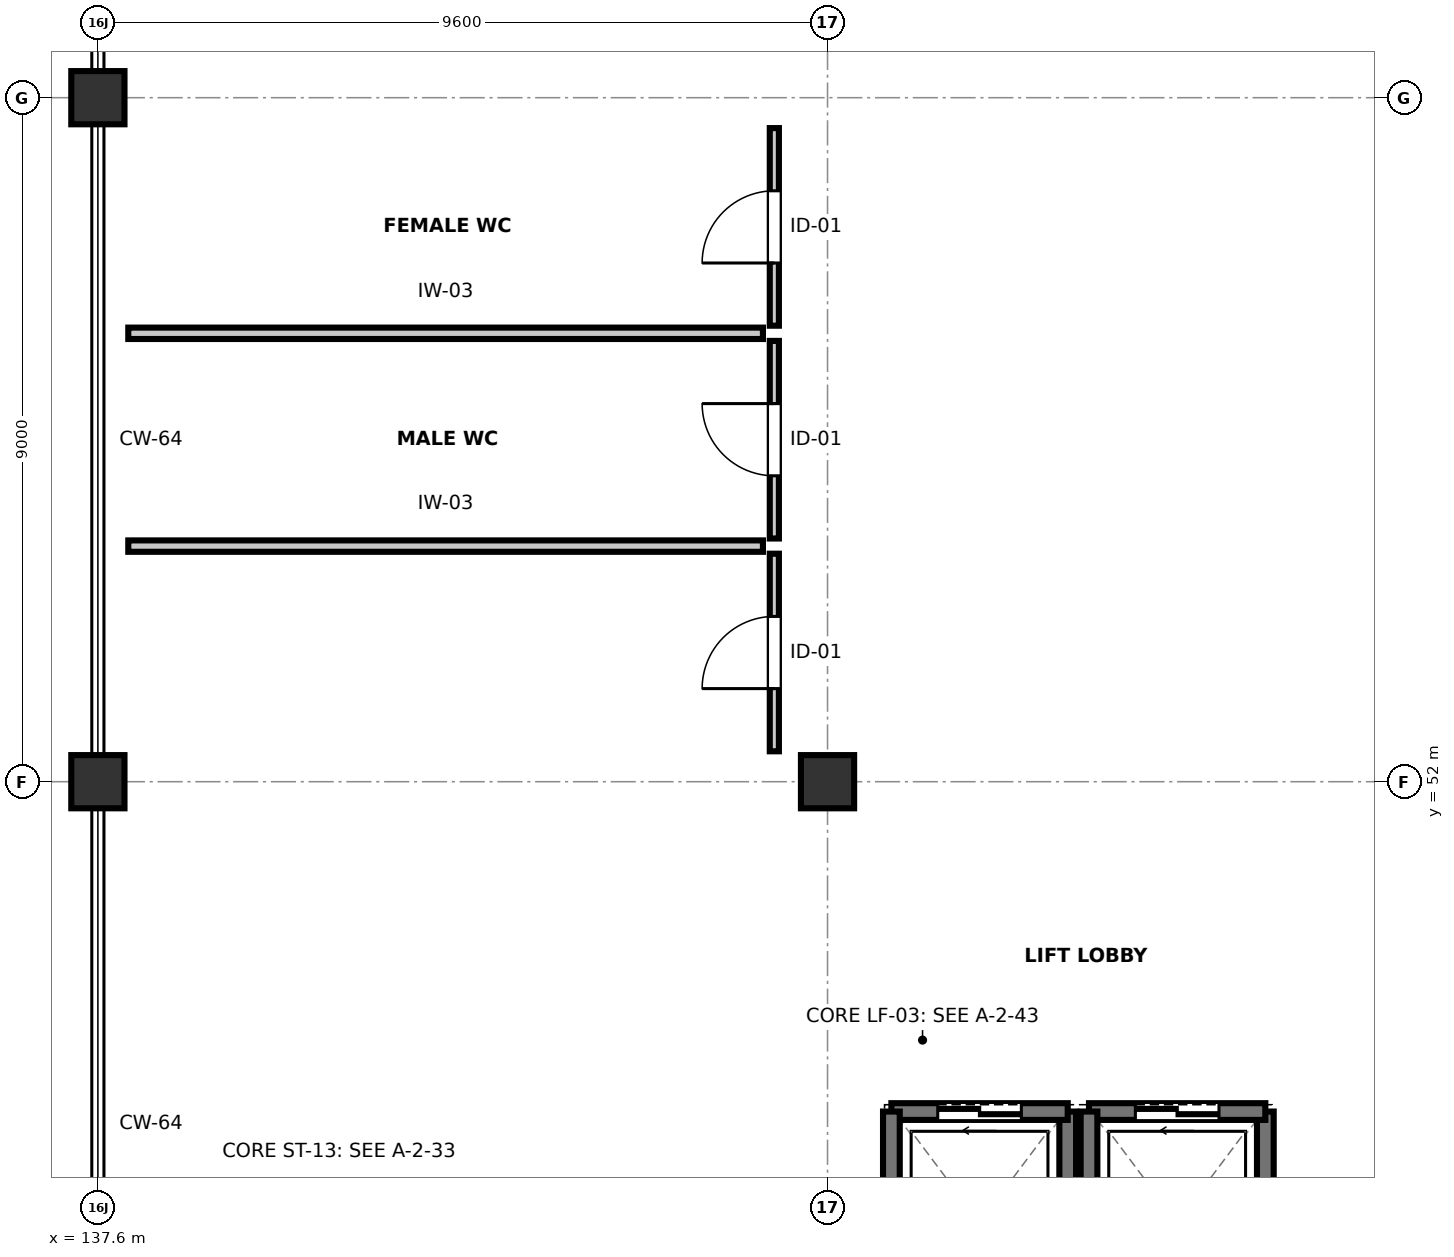
"""IFC4 building model, lengths in metres.
Left out: names, types, materials, properties, quantities, classifications, styles, units other than length and angle.
Written with IfcOpenShell. Run it as: python <this file> out.ifc"""

import sys

from ifc_helpers import new_model, si_unit, direction, frame, frame_2d, origin, origin_2d, place, context, subcontext, project, spatial, rectangle, extrude, element, fill, save


model = new_model("IFC4")
c1 = context("Model", 3, precision=1e-05, world=origin(), true_north=direction((0.0, 1.0)))
c2 = subcontext(c1, "Body", "Model", "MODEL_VIEW")
j1 = project(units=[si_unit("LENGTHUNIT", "METRE"), si_unit("PLANEANGLEUNIT", "RADIAN")], contexts=[c1])
p1 = place(None, origin())
s1 = spatial("IfcSite", under=j1, at=p1, CompositionType="ELEMENT")
p2 = place(p1, origin())
s2 = spatial("IfcBuilding", under=s1, at=p2, CompositionType="ELEMENT")
p3 = place(p2, frame((0.0, 0.0, 19.2)))
s3 = spatial("IfcBuildingStorey", under=s2, at=p3, CompositionType="ELEMENT", Elevation=19.2)
for number, where, z_axis, x_axis in (
    (1, (137.6, 52.0, 0.0), (0.0, 0.0, 1.0), (1.0, 0.0, 0.0)),
    (2, (137.6, 61.0, 0.0), (0.0, 0.0, 1.0), (1.0, 0.0, 0.0)),
    (3, (147.2, 52.0, 0.0), (0.0, 0.0, 1.0), (1.0, 0.0, 0.0)),
):
    element("IfcColumn", number, at=place(p3, frame(where, z_axis=z_axis, x_axis=x_axis)), inside=s3, PredefinedType="COLUMN", context=c2, shape_type="SweptSolid", body=[
        extrude(rectangle(XDim=0.7, YDim=0.7, at=origin_2d()), origin(), (0.0, 0.0, 1.0), 5.4),
    ])
p4 = place(p3, frame((150.36, 44.74, 0.0), z_axis=(0.0, 0.0, 1.0), x_axis=(0.0, 1.0, 0.0)))
e4 = element("IfcWall", 4, at=p4, inside=s3, PredefinedType="SHEAR", context=c2, shape_type="SweptSolid", body=[
    extrude(rectangle(XDim=2.92, YDim=0.22, at=frame_2d((1.46, 0.0))), origin(), (0.0, 0.0, 1.0), 5.16),
])
p5 = place(p3, frame((150.36, 47.66, 0.0), z_axis=(0.0, 0.0, 1.0), x_axis=(-1.0, 0.0, 0.0)))
e5 = element("IfcWall", 5, at=p5, inside=s3, PredefinedType="SHEAR", context=c2, shape_type="SweptSolid", body=[
    extrude(rectangle(XDim=2.32, YDim=0.22, at=frame_2d((1.16, 0.0))), origin(), (0.0, 0.0, 1.0), 5.16),
])
p6 = place(p5, frame((0.61, 0.0, 0.0)))
e6 = element("IfcOpeningElement", 6, at=p6, cuts=e5, PredefinedType="OPENING", context=c2, shape_type="SweptSolid", body=[
    extrude(rectangle(XDim=1.1, YDim=2.15, at=frame_2d((0.55, 1.075))), frame((0.0, 0.12, 0.0), z_axis=(0.0, -1.0, 0.0), x_axis=(1.0, 0.0, 0.0)), (0.0, 0.0, 1.0), 0.24),
])
for number, where, z_axis, x_axis in (
    (7, (148.04, 47.66, 0.0), (0.0, 0.0, 1.0), (0.0, -1.0, 0.0)),
    (8, (152.96, 44.74, 0.0), (0.0, 0.0, 1.0), (0.0, 1.0, 0.0)),
):
    element("IfcWall", number, at=place(p3, frame(where, z_axis=z_axis, x_axis=x_axis)), inside=s3, PredefinedType="SHEAR", context=c2, shape_type="SweptSolid", body=[
        extrude(rectangle(XDim=2.92, YDim=0.22, at=frame_2d((1.46, 0.0))), origin(), (0.0, 0.0, 1.0), 5.16),
    ])
p7 = place(p3, frame((152.96, 47.66, 0.0), z_axis=(0.0, 0.0, 1.0), x_axis=(-1.0, 0.0, 0.0)))
e9 = element("IfcWall", 9, at=p7, inside=s3, PredefinedType="SHEAR", context=c2, shape_type="SweptSolid", body=[
    extrude(rectangle(XDim=2.32, YDim=0.22, at=frame_2d((1.16, 0.0))), origin(), (0.0, 0.0, 1.0), 5.16),
])
p8 = place(p7, frame((0.61, 0.0, 0.0)))
e10 = element("IfcOpeningElement", 10, at=p8, cuts=e9, PredefinedType="OPENING", context=c2, shape_type="SweptSolid", body=[
    extrude(rectangle(XDim=1.1, YDim=2.15, at=frame_2d((0.55, 1.075))), frame((0.0, 0.12, 0.0), z_axis=(0.0, -1.0, 0.0), x_axis=(1.0, 0.0, 0.0)), (0.0, 0.0, 1.0), 0.24),
])
p9 = place(p3, frame((150.64, 47.66, 0.0), z_axis=(0.0, 0.0, 1.0), x_axis=(0.0, -1.0, 0.0)))
e11 = element("IfcWall", 11, at=p9, inside=s3, PredefinedType="SHEAR", context=c2, shape_type="SweptSolid", body=[
    extrude(rectangle(XDim=2.92, YDim=0.22, at=frame_2d((1.46, 0.0))), origin(), (0.0, 0.0, 1.0), 5.16),
])
p10 = place(p3, frame((146.5, 52.4, 0.0), z_axis=(0.0, 0.0, 1.0), x_axis=(0.0, 1.0, 0.0)))
e12 = element("IfcWall", 12, at=p10, inside=s3, PredefinedType="PARTITIONING", context=c2, shape_type="SweptSolid", body=[
    extrude(rectangle(XDim=2.6, YDim=0.12, at=frame_2d((1.3, 0.0))), origin(), (0.0, 0.0, 1.0), 5.145),
])
p11 = place(p10, frame((0.825, 0.0, 0.0)))
e13 = element("IfcOpeningElement", 13, at=p11, cuts=e12, PredefinedType="OPENING", context=c2, shape_type="SweptSolid", body=[
    extrude(rectangle(XDim=0.95, YDim=2.12, at=frame_2d((0.475, 1.06))), frame((0.0, 0.07, 0.0), z_axis=(0.0, -1.0, 0.0), x_axis=(1.0, 0.0, 0.0)), (0.0, 0.0, 1.0), 0.14),
])
p12 = place(p3, frame((146.5, 55.2, 0.0), z_axis=(0.0, 0.0, 1.0), x_axis=(0.0, 1.0, 0.0)))
e14 = element("IfcWall", 14, at=p12, inside=s3, PredefinedType="PARTITIONING", context=c2, shape_type="SweptSolid", body=[
    extrude(rectangle(XDim=2.6, YDim=0.12, at=frame_2d((1.3, 0.0))), origin(), (0.0, 0.0, 1.0), 5.145),
])
p13 = place(p12, frame((0.825, 0.0, 0.0)))
e15 = element("IfcOpeningElement", 15, at=p13, cuts=e14, PredefinedType="OPENING", context=c2, shape_type="SweptSolid", body=[
    extrude(rectangle(XDim=0.95, YDim=2.12, at=frame_2d((0.475, 1.06))), frame((0.0, 0.07, 0.0), z_axis=(0.0, -1.0, 0.0), x_axis=(1.0, 0.0, 0.0)), (0.0, 0.0, 1.0), 0.14),
])
p14 = place(p3, frame((138.0, 55.1, 0.0), z_axis=(0.0, 0.0, 1.0), x_axis=(1.0, 0.0, 0.0)))
e16 = element("IfcWall", 16, at=p14, inside=s3, PredefinedType="PARTITIONING", context=c2, shape_type="SweptSolid", body=[
    extrude(rectangle(XDim=8.35, YDim=0.15, at=frame_2d((4.175, 0.0))), origin(), (0.0, 0.0, 1.0), 5.145),
])
p15 = place(p3, frame((146.5, 58.0, 0.0), z_axis=(0.0, 0.0, 1.0), x_axis=(0.0, 1.0, 0.0)))
e17 = element("IfcWall", 17, at=p15, inside=s3, PredefinedType="PARTITIONING", context=c2, shape_type="SweptSolid", body=[
    extrude(rectangle(XDim=2.6, YDim=0.12, at=frame_2d((1.3, 0.0))), origin(), (0.0, 0.0, 1.0), 5.145),
])
p16 = place(p15, frame((0.825, 0.0, 0.0)))
e18 = element("IfcOpeningElement", 18, at=p16, cuts=e17, PredefinedType="OPENING", context=c2, shape_type="SweptSolid", body=[
    extrude(rectangle(XDim=0.95, YDim=2.12, at=frame_2d((0.475, 1.06))), frame((0.0, 0.07, 0.0), z_axis=(0.0, -1.0, 0.0), x_axis=(1.0, 0.0, 0.0)), (0.0, 0.0, 1.0), 0.14),
])
p17 = place(p3, frame((138.0, 57.9, 0.0), z_axis=(0.0, 0.0, 1.0), x_axis=(1.0, 0.0, 0.0)))
e19 = element("IfcWall", 19, at=p17, inside=s3, PredefinedType="PARTITIONING", context=c2, shape_type="SweptSolid", body=[
    extrude(rectangle(XDim=8.35, YDim=0.15, at=frame_2d((4.175, 0.0))), origin(), (0.0, 0.0, 1.0), 5.145),
])
p18 = place(p6, origin())
e20 = element("IfcDoor", 20, at=p18, inside=s3, OperationType="DOUBLE_DOOR_SLIDING", PredefinedType="DOOR", context=c2, shape_type="SweptSolid", body=[
    extrude(rectangle(XDim=1.1, YDim=2.15, at=frame_2d((0.55, 1.075))), frame((0.0, 0.025, 0.0), z_axis=(0.0, -1.0, 0.0), x_axis=(1.0, 0.0, 0.0)), (0.0, 0.0, 1.0), 0.05),
])
fill(e6, e20)
p19 = place(p8, origin())
e21 = element("IfcDoor", 21, at=p19, inside=s3, OperationType="DOUBLE_DOOR_SLIDING", PredefinedType="DOOR", context=c2, shape_type="SweptSolid", body=[
    extrude(rectangle(XDim=1.1, YDim=2.15, at=frame_2d((0.55, 1.075))), frame((0.0, 0.025, 0.0), z_axis=(0.0, -1.0, 0.0), x_axis=(1.0, 0.0, 0.0)), (0.0, 0.0, 1.0), 0.05),
])
fill(e10, e21)
p20 = place(p11, origin())
e22 = element("IfcDoor", 22, at=p20, inside=s3, OperationType="SINGLE_SWING_LEFT", PredefinedType="DOOR", context=c2, shape_type="SweptSolid", body=[
    extrude(rectangle(XDim=0.95, YDim=2.12, at=frame_2d((0.475, 1.06))), frame((0.0, 0.025, 0.0), z_axis=(0.0, -1.0, 0.0), x_axis=(1.0, 0.0, 0.0)), (0.0, 0.0, 1.0), 0.05),
])
fill(e13, e22)
p21 = place(p13, origin())
e23 = element("IfcDoor", 23, at=p21, inside=s3, OperationType="SINGLE_SWING_RIGHT", PredefinedType="DOOR", context=c2, shape_type="SweptSolid", body=[
    extrude(rectangle(XDim=0.95, YDim=2.12, at=frame_2d((0.475, 1.06))), frame((0.0, 0.025, 0.0), z_axis=(0.0, -1.0, 0.0), x_axis=(1.0, 0.0, 0.0)), (0.0, 0.0, 1.0), 0.05),
])
fill(e15, e23)
p22 = place(p16, origin())
e24 = element("IfcDoor", 24, at=p22, inside=s3, OperationType="SINGLE_SWING_LEFT", PredefinedType="DOOR", context=c2, shape_type="SweptSolid", body=[
    extrude(rectangle(XDim=0.95, YDim=2.12, at=frame_2d((0.475, 1.06))), frame((0.0, 0.025, 0.0), z_axis=(0.0, -1.0, 0.0), x_axis=(1.0, 0.0, 0.0)), (0.0, 0.0, 1.0), 0.05),
])
fill(e18, e24)
save(model, sys.argv[1])
